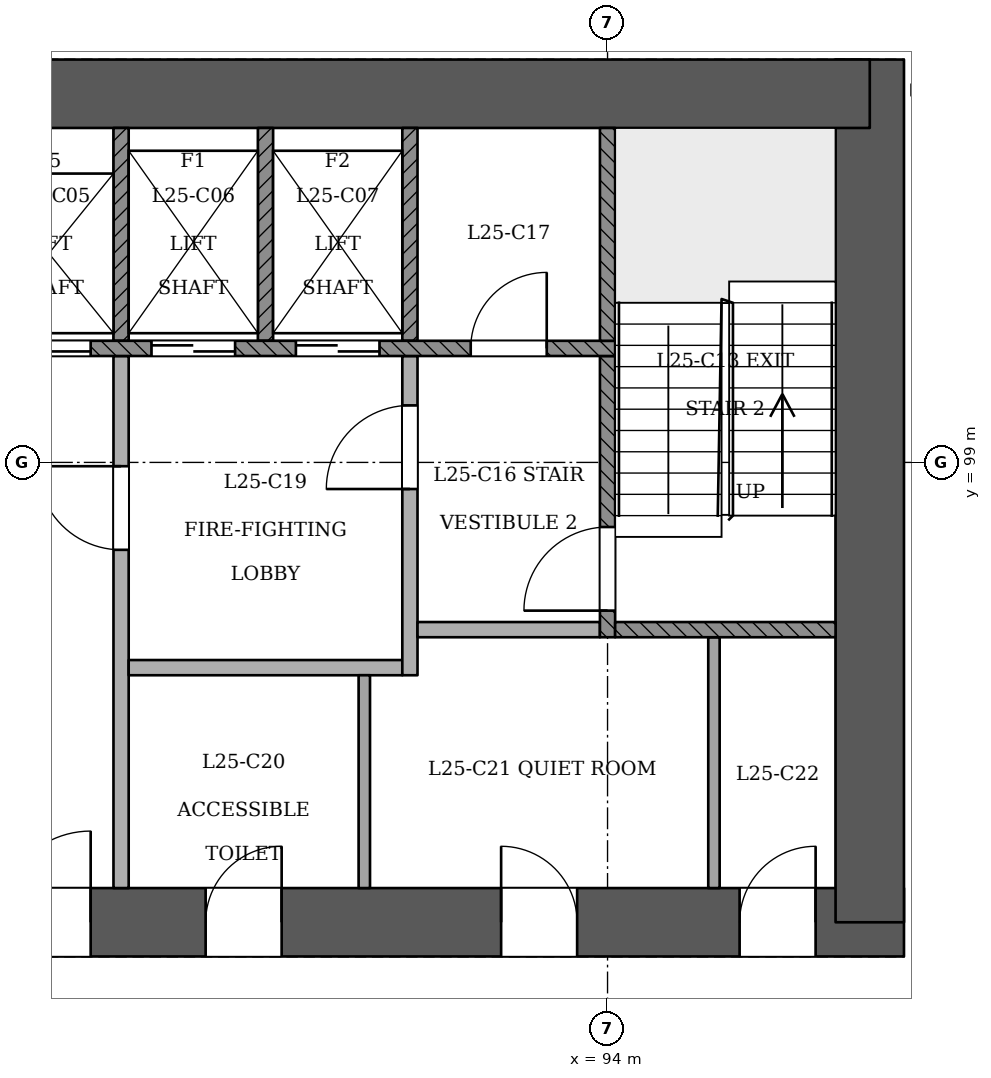
"""IFC4 building model, lengths in metres.
Left out: names, types, materials, properties, quantities, classifications, styles, units other than length and angle.
Written with IfcOpenShell. Run it as: python <this file> out.ifc"""

import sys

from ifc_helpers import new_model, si_unit, direction, frame, frame_2d, origin, place, context, subcontext, project, spatial, rectangle, extrude, element, fill, save


model = new_model("IFC4")
c1 = context("Model", 3, precision=1e-05, world=origin(), true_north=direction((0.0, 1.0)))
c2 = subcontext(c1, "Body", "Model", "MODEL_VIEW")
j1 = project(units=[si_unit("LENGTHUNIT", "METRE"), si_unit("PLANEANGLEUNIT", "RADIAN")], contexts=[c1])
p1 = place(None, origin())
s1 = spatial("IfcSite", under=j1, at=p1, CompositionType="ELEMENT")
p2 = place(p1, origin())
s2 = spatial("IfcBuilding", under=s1, at=p2, CompositionType="ELEMENT")
p3 = place(p2, frame((0.0, 0.0, 100.8)))
s3 = spatial("IfcBuildingStorey", under=s2, at=p3, CompositionType="ELEMENT", Elevation=100.8)
p4 = place(p3, frame((72.55, 92.95, 0.0), z_axis=(0.0, 0.0, 1.0), x_axis=(1.0, 0.0, 0.0)))
e1 = element("IfcWall", 1, at=p4, inside=s3, PredefinedType="SHEAR", context=c2, shape_type="SweptSolid", body=[
    extrude(rectangle(XDim=25.35, YDim=0.9, at=frame_2d((12.675, 0.0))), origin(), (0.0, 0.0, 1.0), 3.6),
])
p5 = place(p4, frame((1.25, 0.0, 0.0)))
e2 = element("IfcOpeningElement", 2, at=p5, cuts=e1, PredefinedType="OPENING", context=c2, shape_type="SweptSolid", body=[
    extrude(rectangle(XDim=1.2, YDim=2.1, at=frame_2d((0.6, 1.05))), frame((0.0, 0.46, 0.0), z_axis=(0.0, -1.0, 0.0), x_axis=(1.0, 0.0, 0.0)), (0.0, 0.0, 1.0), 0.921),
])
p6 = place(p4, frame((3.45, 0.0, 0.0)))
e3 = element("IfcOpeningElement", 3, at=p6, cuts=e1, PredefinedType="OPENING", context=c2, shape_type="SweptSolid", body=[
    extrude(rectangle(XDim=1.2, YDim=2.1, at=frame_2d((0.6, 1.05))), frame((0.0, 0.46, 0.0), z_axis=(0.0, -1.0, 0.0), x_axis=(1.0, 0.0, 0.0)), (0.0, 0.0, 1.0), 0.921),
])
p7 = place(p4, frame((13.45, 0.0, 0.0)))
e4 = element("IfcOpeningElement", 4, at=p7, cuts=e1, PredefinedType="OPENING", context=c2, shape_type="SweptSolid", body=[
    extrude(rectangle(XDim=1.2, YDim=2.1, at=frame_2d((0.6, 1.05))), frame((0.0, 0.46, 0.0), z_axis=(0.0, -1.0, 0.0), x_axis=(1.0, 0.0, 0.0)), (0.0, 0.0, 1.0), 0.921),
])
p8 = place(p4, frame((16.163, 0.0, 0.0)))
e5 = element("IfcOpeningElement", 5, at=p8, cuts=e1, PredefinedType="OPENING", context=c2, shape_type="SweptSolid", body=[
    extrude(rectangle(XDim=1.0, YDim=2.1, at=frame_2d((0.5, 1.05))), frame((0.0, 0.46, 0.0), z_axis=(0.0, -1.0, 0.0), x_axis=(1.0, 0.0, 0.0)), (0.0, 0.0, 1.0), 0.921),
])
p9 = place(p4, frame((20.05, 0.0, 0.0)))
e6 = element("IfcOpeningElement", 6, at=p9, cuts=e1, PredefinedType="OPENING", context=c2, shape_type="SweptSolid", body=[
    extrude(rectangle(XDim=1.0, YDim=2.1, at=frame_2d((0.5, 1.05))), frame((0.0, 0.46, 0.0), z_axis=(0.0, -1.0, 0.0), x_axis=(1.0, 0.0, 0.0)), (0.0, 0.0, 1.0), 0.921),
])
p10 = place(p4, frame((23.188, 0.0, 0.0)))
e7 = element("IfcOpeningElement", 7, at=p10, cuts=e1, PredefinedType="OPENING", context=c2, shape_type="SweptSolid", body=[
    extrude(rectangle(XDim=1.0, YDim=2.1, at=frame_2d((0.5, 1.05))), frame((0.0, 0.46, 0.0), z_axis=(0.0, -1.0, 0.0), x_axis=(1.0, 0.0, 0.0)), (0.0, 0.0, 1.0), 0.921),
])
p11 = place(p3, frame((97.45, 92.95, 0.0), z_axis=(0.0, 0.0, 1.0), x_axis=(0.0, 1.0, 0.0)))
e8 = element("IfcWall", 8, at=p11, inside=s3, PredefinedType="SHEAR", context=c2, shape_type="SweptSolid", body=[
    extrude(rectangle(XDim=11.35, YDim=0.9, at=frame_2d((5.675, 0.0))), origin(), (0.0, 0.0, 1.0), 3.6),
])
p12 = place(p3, frame((97.45, 103.85, 0.0), z_axis=(0.0, 0.0, 1.0), x_axis=(-1.0, 0.0, 0.0)))
e9 = element("IfcWall", 9, at=p12, inside=s3, PredefinedType="SHEAR", context=c2, shape_type="SweptSolid", body=[
    extrude(rectangle(XDim=25.35, YDim=0.9, at=frame_2d((12.675, 0.0))), origin(), (0.0, 0.0, 1.0), 3.6),
])
p13 = place(p3, frame((85.458, 61.474, 0.0), z_axis=(0.0, 0.0, 1.0), x_axis=(0.500000781663, 0.866024952491, 0.0)))
e10 = element("IfcWall", 10, at=p13, inside=s3, PredefinedType="PARTITIONING", context=c2, shape_type="SweptSolid", body=[
    extrude(rectangle(XDim=41.837, YDim=0.15, at=frame_2d((20.919, 0.0))), origin(), (0.0, 0.0, 1.0), 2.7),
])
p14 = place(p13, frame((0.253, 0.0, 0.0)))
e11 = element("IfcOpeningElement", 11, at=p14, cuts=e10, PredefinedType="OPENING", context=c2, shape_type="SweptSolid", body=[
    extrude(rectangle(XDim=1.2, YDim=2.1, at=frame_2d((0.6, 1.05))), frame((0.0, 0.085, 0.0), z_axis=(0.0, -1.0, 0.0), x_axis=(1.0, 0.0, 0.0)), (0.0, 0.0, 1.0), 0.171),
])
p15 = place(p13, frame((5.719, 0.0, 0.0)))
e12 = element("IfcOpeningElement", 12, at=p15, cuts=e10, PredefinedType="OPENING", context=c2, shape_type="SweptSolid", body=[
    extrude(rectangle(XDim=1.2, YDim=2.1, at=frame_2d((0.6, 1.05))), frame((0.0, 0.085, 0.0), z_axis=(0.0, -1.0, 0.0), x_axis=(1.0, 0.0, 0.0)), (0.0, 0.0, 1.0), 0.171),
])
p16 = place(p13, frame((13.669, 0.0, 0.0)))
e13 = element("IfcOpeningElement", 13, at=p16, cuts=e10, PredefinedType="OPENING", context=c2, shape_type="SweptSolid", body=[
    extrude(rectangle(XDim=1.0, YDim=2.1, at=frame_2d((0.5, 1.05))), frame((0.0, 0.085, 0.0), z_axis=(0.0, -1.0, 0.0), x_axis=(1.0, 0.0, 0.0)), (0.0, 0.0, 1.0), 0.171),
])
p17 = place(p13, frame((18.169, 0.0, 0.0)))
e14 = element("IfcOpeningElement", 14, at=p17, cuts=e10, PredefinedType="OPENING", context=c2, shape_type="SweptSolid", body=[
    extrude(rectangle(XDim=1.0, YDim=2.1, at=frame_2d((0.5, 1.05))), frame((0.0, 0.085, 0.0), z_axis=(0.0, -1.0, 0.0), x_axis=(1.0, 0.0, 0.0)), (0.0, 0.0, 1.0), 0.171),
])
p18 = place(p13, frame((21.639, 0.0, 0.0)))
e15 = element("IfcOpeningElement", 15, at=p18, cuts=e10, PredefinedType="OPENING", context=c2, shape_type="SweptSolid", body=[
    extrude(rectangle(XDim=1.0, YDim=2.1, at=frame_2d((0.5, 1.05))), frame((0.0, 0.085, 0.0), z_axis=(0.0, -1.0, 0.0), x_axis=(1.0, 0.0, 0.0)), (0.0, 0.0, 1.0), 0.171),
])
p19 = place(p13, frame((27.169, 0.0, 0.0)))
e16 = element("IfcOpeningElement", 16, at=p19, cuts=e10, PredefinedType="OPENING", context=c2, shape_type="SweptSolid", body=[
    extrude(rectangle(XDim=1.0, YDim=2.1, at=frame_2d((0.5, 1.05))), frame((0.0, 0.085, 0.0), z_axis=(0.0, -1.0, 0.0), x_axis=(1.0, 0.0, 0.0)), (0.0, 0.0, 1.0), 0.171),
])
p20 = place(p13, frame((30.639, 0.0, 0.0)))
e17 = element("IfcOpeningElement", 17, at=p20, cuts=e10, PredefinedType="OPENING", context=c2, shape_type="SweptSolid", body=[
    extrude(rectangle(XDim=1.0, YDim=2.1, at=frame_2d((0.5, 1.05))), frame((0.0, 0.085, 0.0), z_axis=(0.0, -1.0, 0.0), x_axis=(1.0, 0.0, 0.0)), (0.0, 0.0, 1.0), 0.171),
])
p21 = place(p13, frame((37.71, 0.0, 0.0)))
e18 = element("IfcOpeningElement", 18, at=p21, cuts=e10, PredefinedType="OPENING", context=c2, shape_type="SweptSolid", body=[
    extrude(rectangle(XDim=1.2, YDim=2.1, at=frame_2d((0.6, 1.05))), frame((0.0, 0.085, 0.0), z_axis=(0.0, -1.0, 0.0), x_axis=(1.0, 0.0, 0.0)), (0.0, 0.0, 1.0), 0.171),
])
p22 = place(p3, frame((87.6, 93.4, 0.0), z_axis=(0.0, 0.0, 1.0), x_axis=(0.0, 1.0, 0.0)))
e19 = element("IfcWall", 19, at=p22, inside=s3, PredefinedType="PARTITIONING", context=c2, shape_type="SweptSolid", body=[
    extrude(rectangle(XDim=7.0, YDim=0.2, at=frame_2d((3.5, 0.0))), origin(), (0.0, 0.0, 1.0), 3.1),
])
p23 = place(p22, frame((4.45, 0.0, 0.0)))
e20 = element("IfcOpeningElement", 20, at=p23, cuts=e19, PredefinedType="OPENING", context=c2, shape_type="SweptSolid", body=[
    extrude(rectangle(XDim=1.1, YDim=2.1, at=frame_2d((0.55, 1.05))), frame((0.0, 0.11, 0.0), z_axis=(0.0, -1.0, 0.0), x_axis=(1.0, 0.0, 0.0)), (0.0, 0.0, 1.0), 0.221),
])
p24 = place(p3, frame((90.8, 93.4, 0.0), z_axis=(0.0, 0.0, 1.0), x_axis=(0.0, 1.0, 0.0)))
e21 = element("IfcWall", 21, at=p24, inside=s3, PredefinedType="PARTITIONING", context=c2, shape_type="SweptSolid", body=[
    extrude(rectangle(XDim=2.8, YDim=0.15, at=frame_2d((1.4, 0.0))), origin(), (0.0, 0.0, 1.0), 3.1),
])
p25 = place(p3, frame((95.4, 93.4, 0.0), z_axis=(0.0, 0.0, 1.0), x_axis=(0.0, 1.0, 0.0)))
e22 = element("IfcWall", 22, at=p25, inside=s3, PredefinedType="PARTITIONING", context=c2, shape_type="SweptSolid", body=[
    extrude(rectangle(XDim=3.3, YDim=0.15, at=frame_2d((1.65, 0.0))), origin(), (0.0, 0.0, 1.0), 3.1),
])
p26 = place(p3, frame((87.7, 96.3, 0.0), z_axis=(0.0, 0.0, 1.0), x_axis=(1.0, 0.0, 0.0)))
e23 = element("IfcWall", 23, at=p26, inside=s3, PredefinedType="PARTITIONING", context=c2, shape_type="SweptSolid", body=[
    extrude(rectangle(XDim=3.6, YDim=0.2, at=frame_2d((1.8, 0.0))), origin(), (0.0, 0.0, 1.0), 3.1),
])
p27 = place(p3, frame((91.4, 96.2, 0.0), z_axis=(0.0, 0.0, 1.0), x_axis=(0.0, 1.0, 0.0)))
e24 = element("IfcWall", 24, at=p27, inside=s3, PredefinedType="PARTITIONING", context=c2, shape_type="SweptSolid", body=[
    extrude(rectangle(XDim=4.2, YDim=0.2, at=frame_2d((2.1, 0.0))), origin(), (0.0, 0.0, 1.0), 3.1),
])
p28 = place(p27, frame((2.45, 0.0, 0.0)))
e25 = element("IfcOpeningElement", 25, at=p28, cuts=e24, PredefinedType="OPENING", context=c2, shape_type="SweptSolid", body=[
    extrude(rectangle(XDim=1.1, YDim=2.1, at=frame_2d((0.55, 1.05))), frame((0.0, 0.11, 0.0), z_axis=(0.0, -1.0, 0.0), x_axis=(1.0, 0.0, 0.0)), (0.0, 0.0, 1.0), 0.221),
])
p29 = place(p3, frame((91.5, 96.8, 0.0), z_axis=(0.0, 0.0, 1.0), x_axis=(1.0, 0.0, 0.0)))
e26 = element("IfcWall", 26, at=p29, inside=s3, PredefinedType="PARTITIONING", context=c2, shape_type="SweptSolid", body=[
    extrude(rectangle(XDim=2.4, YDim=0.2, at=frame_2d((1.2, 0.0))), origin(), (0.0, 0.0, 1.0), 3.1),
])
p30 = place(p3, frame((94.0, 96.7, 0.0), z_axis=(0.0, 0.0, 1.0), x_axis=(0.0, 1.0, 0.0)))
e27 = element("IfcWall", 27, at=p30, inside=s3, PredefinedType="SOLIDWALL", context=c2, shape_type="SweptSolid", body=[
    extrude(rectangle(XDim=3.7, YDim=0.2, at=frame_2d((1.85, 0.0))), origin(), (0.0, 0.0, 1.0), 3.1),
])
p31 = place(p30, frame((0.35, 0.0, 0.0)))
e28 = element("IfcOpeningElement", 28, at=p31, cuts=e27, PredefinedType="OPENING", context=c2, shape_type="SweptSolid", body=[
    extrude(rectangle(XDim=1.1, YDim=2.1, at=frame_2d((0.55, 1.05))), frame((0.0, 0.11, 0.0), z_axis=(0.0, -1.0, 0.0), x_axis=(1.0, 0.0, 0.0)), (0.0, 0.0, 1.0), 0.221),
])
p32 = place(p3, frame((94.1, 96.8, 0.0), z_axis=(0.0, 0.0, 1.0), x_axis=(1.0, 0.0, 0.0)))
e29 = element("IfcWall", 29, at=p32, inside=s3, PredefinedType="SOLIDWALL", context=c2, shape_type="SweptSolid", body=[
    extrude(rectangle(XDim=2.9, YDim=0.2, at=frame_2d((1.45, 0.0))), origin(), (0.0, 0.0, 1.0), 3.1),
])
p33 = place(p3, frame((75.9, 100.5, 0.0), z_axis=(0.0, 0.0, 1.0), x_axis=(1.0, 0.0, 0.0)))
e30 = element("IfcWall", 30, at=p33, inside=s3, PredefinedType="SOLIDWALL", context=c2, shape_type="SweptSolid", body=[
    extrude(rectangle(XDim=18.2, YDim=0.2, at=frame_2d((9.1, 0.0))), origin(), (0.0, 0.0, 1.0), 3.1),
])
p34 = place(p33, frame((2.6, 0.0, 0.0)))
e31 = element("IfcOpeningElement", 31, at=p34, cuts=e30, PredefinedType="OPENING", context=c2, shape_type="SweptSolid", body=[
    extrude(rectangle(XDim=1.1, YDim=2.1, at=frame_2d((0.55, 1.05))), frame((0.0, 0.11, 0.0), z_axis=(0.0, -1.0, 0.0), x_axis=(1.0, 0.0, 0.0)), (0.0, 0.0, 1.0), 0.221),
])
p35 = place(p33, frame((4.5, 0.0, 0.0)))
e32 = element("IfcOpeningElement", 32, at=p35, cuts=e30, PredefinedType="OPENING", context=c2, shape_type="SweptSolid", body=[
    extrude(rectangle(XDim=1.1, YDim=2.1, at=frame_2d((0.55, 1.05))), frame((0.0, 0.11, 0.0), z_axis=(0.0, -1.0, 0.0), x_axis=(1.0, 0.0, 0.0)), (0.0, 0.0, 1.0), 0.221),
])
p36 = place(p33, frame((6.4, 0.0, 0.0)))
e33 = element("IfcOpeningElement", 33, at=p36, cuts=e30, PredefinedType="OPENING", context=c2, shape_type="SweptSolid", body=[
    extrude(rectangle(XDim=1.1, YDim=2.1, at=frame_2d((0.55, 1.05))), frame((0.0, 0.11, 0.0), z_axis=(0.0, -1.0, 0.0), x_axis=(1.0, 0.0, 0.0)), (0.0, 0.0, 1.0), 0.221),
])
p37 = place(p33, frame((8.3, 0.0, 0.0)))
e34 = element("IfcOpeningElement", 34, at=p37, cuts=e30, PredefinedType="OPENING", context=c2, shape_type="SweptSolid", body=[
    extrude(rectangle(XDim=1.1, YDim=2.1, at=frame_2d((0.55, 1.05))), frame((0.0, 0.11, 0.0), z_axis=(0.0, -1.0, 0.0), x_axis=(1.0, 0.0, 0.0)), (0.0, 0.0, 1.0), 0.221),
])
p38 = place(p33, frame((10.2, 0.0, 0.0)))
e35 = element("IfcOpeningElement", 35, at=p38, cuts=e30, PredefinedType="OPENING", context=c2, shape_type="SweptSolid", body=[
    extrude(rectangle(XDim=1.1, YDim=2.1, at=frame_2d((0.55, 1.05))), frame((0.0, 0.11, 0.0), z_axis=(0.0, -1.0, 0.0), x_axis=(1.0, 0.0, 0.0)), (0.0, 0.0, 1.0), 0.221),
])
p39 = place(p33, frame((12.1, 0.0, 0.0)))
e36 = element("IfcOpeningElement", 36, at=p39, cuts=e30, PredefinedType="OPENING", context=c2, shape_type="SweptSolid", body=[
    extrude(rectangle(XDim=1.1, YDim=2.1, at=frame_2d((0.55, 1.05))), frame((0.0, 0.11, 0.0), z_axis=(0.0, -1.0, 0.0), x_axis=(1.0, 0.0, 0.0)), (0.0, 0.0, 1.0), 0.221),
])
p40 = place(p33, frame((14.0, 0.0, 0.0)))
e37 = element("IfcOpeningElement", 37, at=p40, cuts=e30, PredefinedType="OPENING", context=c2, shape_type="SweptSolid", body=[
    extrude(rectangle(XDim=1.1, YDim=2.1, at=frame_2d((0.55, 1.05))), frame((0.0, 0.11, 0.0), z_axis=(0.0, -1.0, 0.0), x_axis=(1.0, 0.0, 0.0)), (0.0, 0.0, 1.0), 0.221),
])
p41 = place(p33, frame((0.65, 0.0, 0.0)))
e38 = element("IfcOpeningElement", 38, at=p41, cuts=e30, PredefinedType="OPENING", context=c2, shape_type="SweptSolid", body=[
    extrude(rectangle(XDim=1.0, YDim=2.1, at=frame_2d((0.5, 1.05))), frame((0.0, 0.11, 0.0), z_axis=(0.0, -1.0, 0.0), x_axis=(1.0, 0.0, 0.0)), (0.0, 0.0, 1.0), 0.221),
])
p42 = place(p33, frame((16.3, 0.0, 0.0)))
e39 = element("IfcOpeningElement", 39, at=p42, cuts=e30, PredefinedType="OPENING", context=c2, shape_type="SweptSolid", body=[
    extrude(rectangle(XDim=1.0, YDim=2.1, at=frame_2d((0.5, 1.05))), frame((0.0, 0.11, 0.0), z_axis=(0.0, -1.0, 0.0), x_axis=(1.0, 0.0, 0.0)), (0.0, 0.0, 1.0), 0.221),
])
for number, where, z_axis, x_axis in (
    (40, (87.6, 100.6, 0.0), (0.0, 0.0, 1.0), (0.0, 1.0, 0.0)),
    (41, (89.5, 100.6, 0.0), (0.0, 0.0, 1.0), (0.0, 1.0, 0.0)),
    (42, (91.4, 100.6, 0.0), (0.0, 0.0, 1.0), (0.0, 1.0, 0.0)),
    (43, (94.0, 100.6, 0.0), (0.0, 0.0, 1.0), (0.0, 1.0, 0.0)),
):
    element("IfcWall", number, at=place(p3, frame(where, z_axis=z_axis, x_axis=x_axis)), inside=s3, PredefinedType="SOLIDWALL", context=c2, shape_type="SweptSolid", body=[
        extrude(rectangle(XDim=2.8, YDim=0.2, at=frame_2d((1.4, 0.0))), origin(), (0.0, 0.0, 1.0), 3.1),
    ])
p43 = place(p38, origin())
e44 = element("IfcDoor", 44, at=p43, inside=s3, OperationType="SLIDING_TO_RIGHT", PredefinedType="NOTDEFINED", context=c2, shape_type="SweptSolid", body=[
    extrude(rectangle(XDim=1.1, YDim=2.1, at=frame_2d((0.55, 1.05))), frame((0.0, 0.025, 0.0), z_axis=(0.0, -1.0, 0.0), x_axis=(1.0, 0.0, 0.0)), (0.0, 0.0, 1.0), 0.05),
])
fill(e35, e44)
p44 = place(p39, origin())
e45 = element("IfcDoor", 45, at=p44, inside=s3, OperationType="SLIDING_TO_RIGHT", PredefinedType="NOTDEFINED", context=c2, shape_type="SweptSolid", body=[
    extrude(rectangle(XDim=1.1, YDim=2.1, at=frame_2d((0.55, 1.05))), frame((0.0, 0.025, 0.0), z_axis=(0.0, -1.0, 0.0), x_axis=(1.0, 0.0, 0.0)), (0.0, 0.0, 1.0), 0.05),
])
fill(e36, e45)
p45 = place(p40, origin())
e46 = element("IfcDoor", 46, at=p45, inside=s3, OperationType="SLIDING_TO_LEFT", PredefinedType="NOTDEFINED", context=c2, shape_type="SweptSolid", body=[
    extrude(rectangle(XDim=1.1, YDim=2.1, at=frame_2d((0.55, 1.05))), frame((0.0, 0.025, 0.0), z_axis=(0.0, -1.0, 0.0), x_axis=(1.0, 0.0, 0.0)), (0.0, 0.0, 1.0), 0.05),
])
fill(e37, e46)
p46 = place(p31, origin())
e47 = element("IfcDoor", 47, at=p46, inside=s3, OperationType="SINGLE_SWING_LEFT", PredefinedType="NOTDEFINED", context=c2, shape_type="SweptSolid", body=[
    extrude(rectangle(XDim=1.1, YDim=2.1, at=frame_2d((0.55, 1.05))), frame((0.0, 0.025, 0.0), z_axis=(0.0, -1.0, 0.0), x_axis=(1.0, 0.0, 0.0)), (0.0, 0.0, 1.0), 0.05),
])
fill(e28, e47)
p47 = place(p23, origin())
e48 = element("IfcDoor", 48, at=p47, inside=s3, OperationType="SINGLE_SWING_RIGHT", PredefinedType="NOTDEFINED", context=c2, shape_type="SweptSolid", body=[
    extrude(rectangle(XDim=1.1, YDim=2.1, at=frame_2d((0.55, 1.05))), frame((0.0, 0.025, 0.0), z_axis=(0.0, -1.0, 0.0), x_axis=(1.0, 0.0, 0.0)), (0.0, 0.0, 1.0), 0.05),
])
fill(e20, e48)
p48 = place(p28, origin())
e49 = element("IfcDoor", 49, at=p48, inside=s3, OperationType="SINGLE_SWING_LEFT", PredefinedType="NOTDEFINED", context=c2, shape_type="SweptSolid", body=[
    extrude(rectangle(XDim=1.1, YDim=2.1, at=frame_2d((0.55, 1.05))), frame((0.0, 0.025, 0.0), z_axis=(0.0, -1.0, 0.0), x_axis=(1.0, 0.0, 0.0)), (0.0, 0.0, 1.0), 0.05),
])
fill(e25, e49)
p49 = place(p7, origin())
e50 = element("IfcDoor", 50, at=p49, inside=s3, OperationType="SINGLE_SWING_RIGHT", PredefinedType="NOTDEFINED", context=c2, shape_type="SweptSolid", body=[
    extrude(rectangle(XDim=1.2, YDim=2.1, at=frame_2d((0.6, 1.05))), frame((0.0, 0.025, 0.0), z_axis=(0.0, -1.0, 0.0), x_axis=(1.0, 0.0, 0.0)), (0.0, 0.0, 1.0), 0.05),
])
fill(e4, e50)
p50 = place(p42, origin())
e51 = element("IfcDoor", 51, at=p50, inside=s3, OperationType="SINGLE_SWING_RIGHT", PredefinedType="NOTDEFINED", context=c2, shape_type="SweptSolid", body=[
    extrude(rectangle(XDim=1.0, YDim=2.1, at=frame_2d((0.5, 1.05))), frame((0.0, 0.025, 0.0), z_axis=(0.0, -1.0, 0.0), x_axis=(1.0, 0.0, 0.0)), (0.0, 0.0, 1.0), 0.05),
])
fill(e39, e51)
p51 = place(p8, origin())
e52 = element("IfcDoor", 52, at=p51, inside=s3, OperationType="SINGLE_SWING_RIGHT", PredefinedType="NOTDEFINED", context=c2, shape_type="SweptSolid", body=[
    extrude(rectangle(XDim=1.0, YDim=2.1, at=frame_2d((0.5, 1.05))), frame((0.0, 0.025, 0.0), z_axis=(0.0, -1.0, 0.0), x_axis=(1.0, 0.0, 0.0)), (0.0, 0.0, 1.0), 0.05),
])
fill(e5, e52)
p52 = place(p9, origin())
e53 = element("IfcDoor", 53, at=p52, inside=s3, OperationType="SINGLE_SWING_LEFT", PredefinedType="NOTDEFINED", context=c2, shape_type="SweptSolid", body=[
    extrude(rectangle(XDim=1.0, YDim=2.1, at=frame_2d((0.5, 1.05))), frame((0.0, 0.025, 0.0), z_axis=(0.0, -1.0, 0.0), x_axis=(1.0, 0.0, 0.0)), (0.0, 0.0, 1.0), 0.05),
])
fill(e6, e53)
p53 = place(p10, origin())
e54 = element("IfcDoor", 54, at=p53, inside=s3, OperationType="SINGLE_SWING_RIGHT", PredefinedType="NOTDEFINED", context=c2, shape_type="SweptSolid", body=[
    extrude(rectangle(XDim=1.0, YDim=2.1, at=frame_2d((0.5, 1.05))), frame((0.0, 0.025, 0.0), z_axis=(0.0, -1.0, 0.0), x_axis=(1.0, 0.0, 0.0)), (0.0, 0.0, 1.0), 0.05),
])
fill(e7, e54)
save(model, sys.argv[1])
